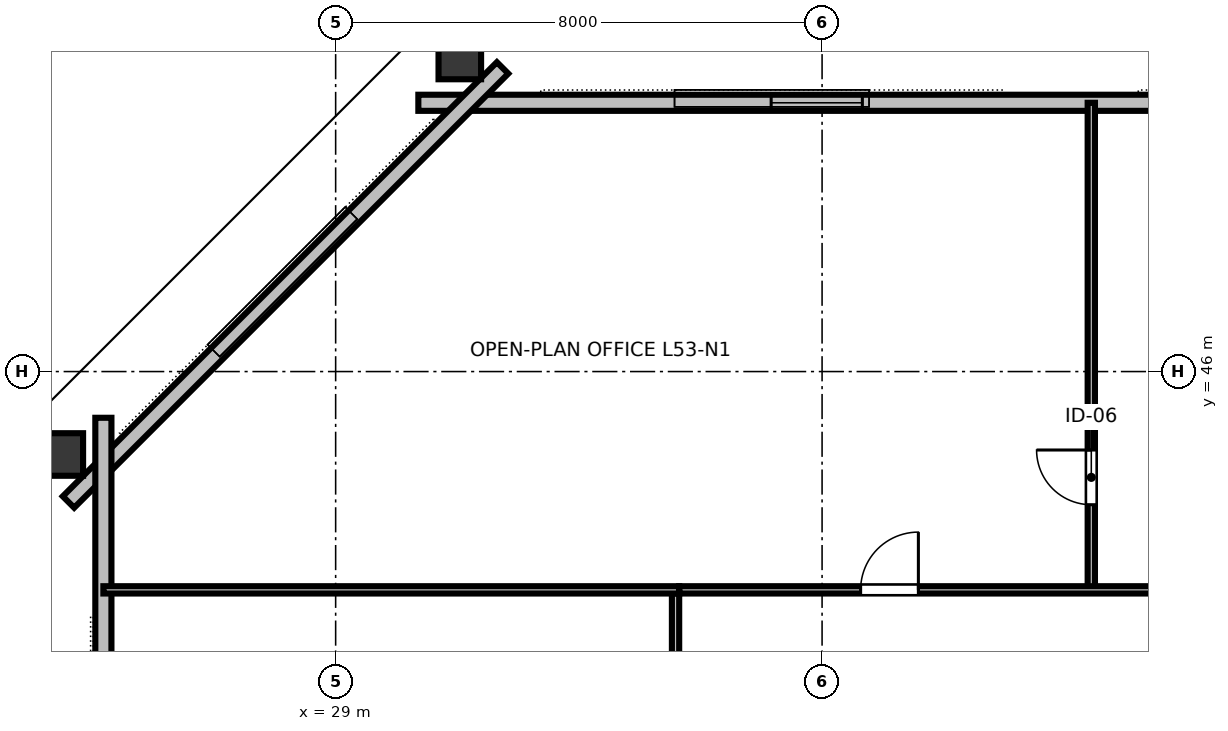
"""IFC4 building model, lengths in metres.
Left out: names, types, materials, properties, quantities, classifications, styles, units other than length and angle.
Written with IfcOpenShell. Run it as: python <this file> out.ifc"""

import sys

from ifc_helpers import new_model, si_unit, direction, frame, frame_2d, origin, origin_2d, place, context, subcontext, project, spatial, rectangle, hollow_rectangle, extrude, element, fill, save


model = new_model("IFC4")
c1 = context("Model", 3, precision=1e-05, world=origin(), true_north=direction((0.0, 1.0)))
c2 = subcontext(c1, "Body", "Model", "MODEL_VIEW")
j1 = project(units=[si_unit("LENGTHUNIT", "METRE"), si_unit("PLANEANGLEUNIT", "RADIAN")], contexts=[c1])
p1 = place(None, origin())
s1 = spatial("IfcSite", under=j1, at=p1, CompositionType="ELEMENT")
p2 = place(p1, origin())
s2 = spatial("IfcBuilding", under=s1, at=p2, CompositionType="ELEMENT")
p3 = place(p2, frame((0.0, 0.0, 202.2)))
s3 = spatial("IfcBuildingStorey", under=s2, at=p3, CompositionType="ELEMENT", Elevation=202.2)
for number, where, z_axis, x_axis in (
    (1, (31.042, 51.232, 0.0), (0.0, 0.0, 1.0), (1.0, 0.0, 0.0)),
    (2, (24.421, 44.636, 0.0), (0.0, 0.0, 1.0), (0.0, 1.0, 0.0)),
):
    element("IfcColumn", number, at=place(p3, frame(where, z_axis=z_axis, x_axis=x_axis)), inside=s3, PredefinedType="COLUMN", context=c2, shape_type="SweptSolid", body=[
        extrude(hollow_rectangle(XDim=0.7, YDim=0.85, WallThickness=0.04, at=origin_2d()), origin(), (0.0, 0.0, 1.0), 3.373),
    ])
p4 = place(p3, frame((61.64, 50.42, 0.0), z_axis=(0.0, 0.0, 1.0), x_axis=(-1.0, 0.0, 0.0)))
e3 = element("IfcWall", 3, at=p4, inside=s3, PredefinedType="STANDARD", context=c2, shape_type="SweptSolid", body=[
    extrude(rectangle(XDim=31.28, YDim=0.265, at=frame_2d((15.64, 0.0))), origin(), (0.0, 0.0, 1.0), 3.375),
])
p5 = place(p4, frame((5.802, 0.0, 0.85)))
e4 = element("IfcOpeningElement", 4, at=p5, cuts=e3, PredefinedType="OPENING", context=c2, shape_type="SweptSolid", body=[
    extrude(rectangle(XDim=1.5, YDim=1.85, at=frame_2d((0.75, 0.925))), frame((0.0, 0.142, 0.0), z_axis=(0.0, -1.0, 0.0), x_axis=(1.0, 0.0, 0.0)), (0.0, 0.0, 1.0), 0.285),
])
p6 = place(p4, frame((9.438, 0.0, 0.85)))
e5 = element("IfcOpeningElement", 5, at=p6, cuts=e3, PredefinedType="OPENING", context=c2, shape_type="SweptSolid", body=[
    extrude(rectangle(XDim=1.5, YDim=1.85, at=frame_2d((0.75, 0.925))), frame((0.0, 0.142, 0.0), z_axis=(0.0, -1.0, 0.0), x_axis=(1.0, 0.0, 0.0)), (0.0, 0.0, 1.0), 0.285),
])
p7 = place(p4, frame((13.073, 0.0, 0.85)))
e6 = element("IfcOpeningElement", 6, at=p7, cuts=e3, PredefinedType="OPENING", context=c2, shape_type="SweptSolid", body=[
    extrude(rectangle(XDim=1.5, YDim=1.85, at=frame_2d((0.75, 0.925))), frame((0.0, 0.142, 0.0), z_axis=(0.0, -1.0, 0.0), x_axis=(1.0, 0.0, 0.0)), (0.0, 0.0, 1.0), 0.285),
])
p8 = place(p4, frame((16.708, 0.0, 0.85)))
e7 = element("IfcOpeningElement", 7, at=p8, cuts=e3, PredefinedType="OPENING", context=c2, shape_type="SweptSolid", body=[
    extrude(rectangle(XDim=1.5, YDim=1.85, at=frame_2d((0.75, 0.925))), frame((0.0, 0.142, 0.0), z_axis=(0.0, -1.0, 0.0), x_axis=(1.0, 0.0, 0.0)), (0.0, 0.0, 1.0), 0.285),
])
p9 = place(p4, frame((23.978, 0.0, 0.85)))
e8 = element("IfcOpeningElement", 8, at=p9, cuts=e3, PredefinedType="OPENING", context=c2, shape_type="SweptSolid", body=[
    extrude(rectangle(XDim=1.5, YDim=1.85, at=frame_2d((0.75, 0.925))), frame((0.0, 0.142, 0.0), z_axis=(0.0, -1.0, 0.0), x_axis=(1.0, 0.0, 0.0)), (0.0, 0.0, 1.0), 0.285),
])
p10 = place(p3, frame((31.746, 50.994, 0.0), z_axis=(0.0, 0.0, 1.0), x_axis=(-0.707106781187, -0.707106781187, 0.0)))
e9 = element("IfcWall", 9, at=p10, inside=s3, PredefinedType="STANDARD", context=c2, shape_type="SweptSolid", body=[
    extrude(rectangle(XDim=10.097, YDim=0.265, at=frame_2d((5.048, 0.0))), origin(), (0.0, 0.0, 1.0), 3.375),
])
p11 = place(p3, frame((25.18, 45.24, 0.0), z_axis=(0.0, 0.0, 1.0), x_axis=(0.0, -1.0, 0.0)))
e10 = element("IfcWall", 10, at=p11, inside=s3, PredefinedType="STANDARD", context=c2, shape_type="SweptSolid", body=[
    extrude(rectangle(XDim=26.48, YDim=0.265, at=frame_2d((13.24, 0.0))), origin(), (0.0, 0.0, 1.0), 3.375),
])
p12 = place(p11, frame((6.42, 0.0, 0.85)))
e11 = element("IfcOpeningElement", 11, at=p12, cuts=e10, PredefinedType="OPENING", context=c2, shape_type="SweptSolid", body=[
    extrude(rectangle(XDim=1.5, YDim=1.85, at=frame_2d((0.75, 0.925))), frame((0.0, 0.142, 0.0), z_axis=(0.0, -1.0, 0.0), x_axis=(1.0, 0.0, 0.0)), (0.0, 0.0, 1.0), 0.285),
])
p13 = place(p11, frame((14.513, 0.0, 0.85)))
e12 = element("IfcOpeningElement", 12, at=p13, cuts=e10, PredefinedType="OPENING", context=c2, shape_type="SweptSolid", body=[
    extrude(rectangle(XDim=1.5, YDim=1.85, at=frame_2d((0.75, 0.925))), frame((0.0, 0.142, 0.0), z_axis=(0.0, -1.0, 0.0), x_axis=(1.0, 0.0, 0.0)), (0.0, 0.0, 1.0), 0.285),
])
p14 = place(p11, frame((18.56, 0.0, 0.85)))
e13 = element("IfcOpeningElement", 13, at=p14, cuts=e10, PredefinedType="OPENING", context=c2, shape_type="SweptSolid", body=[
    extrude(rectangle(XDim=1.5, YDim=1.85, at=frame_2d((0.75, 0.925))), frame((0.0, 0.142, 0.0), z_axis=(0.0, -1.0, 0.0), x_axis=(1.0, 0.0, 0.0)), (0.0, 0.0, 1.0), 0.285),
])
p15 = place(p3, frame((41.428, 42.41, 0.0), z_axis=(0.0, 0.0, 1.0), x_axis=(0.0, 1.0, 0.0)))
e14 = element("IfcWall", 14, at=p15, inside=s3, PredefinedType="PARTITIONING", context=c2, shape_type="SweptSolid", body=[
    extrude(rectangle(XDim=8.01, YDim=0.12, at=frame_2d((4.005, 0.0))), origin(), (0.0, 0.0, 1.0), 2.655),
])
p16 = place(p15, frame((1.4, 0.0, 0.0)))
e15 = element("IfcOpeningElement", 15, at=p16, cuts=e14, PredefinedType="OPENING", context=c2, shape_type="SweptSolid", body=[
    extrude(rectangle(XDim=0.9, YDim=2.15, at=frame_2d((0.45, 1.075))), frame((0.0, 0.07, 0.0), z_axis=(0.0, -1.0, 0.0), x_axis=(1.0, 0.0, 0.0)), (0.0, 0.0, 1.0), 0.14),
])
p17 = place(p3, frame((34.65, 42.41, 0.0), z_axis=(0.0, 0.0, 1.0), x_axis=(1.0, 0.0, 0.0)))
e16 = element("IfcWall", 16, at=p17, inside=s3, PredefinedType="PARTITIONING", context=c2, shape_type="SweptSolid", body=[
    extrude(rectangle(XDim=10.33, YDim=0.12, at=frame_2d((5.165, 0.0))), origin(), (0.0, 0.0, 1.0), 2.655),
])
p18 = place(p17, frame((2.984, 0.0, 0.0)))
e17 = element("IfcOpeningElement", 17, at=p18, cuts=e16, PredefinedType="OPENING", context=c2, shape_type="SweptSolid", body=[
    extrude(rectangle(XDim=0.95, YDim=2.15, at=frame_2d((0.475, 1.075))), frame((0.0, 0.07, 0.0), z_axis=(0.0, -1.0, 0.0), x_axis=(1.0, 0.0, 0.0)), (0.0, 0.0, 1.0), 0.14),
])
p19 = place(p17, frame((8.079, 0.0, 0.0)))
e18 = element("IfcOpeningElement", 18, at=p19, cuts=e16, PredefinedType="OPENING", context=c2, shape_type="SweptSolid", body=[
    extrude(rectangle(XDim=0.95, YDim=2.15, at=frame_2d((0.475, 1.075))), frame((0.0, 0.07, 0.0), z_axis=(0.0, -1.0, 0.0), x_axis=(1.0, 0.0, 0.0)), (0.0, 0.0, 1.0), 0.14),
])
p20 = place(p3, frame((34.59, 21.65, 0.0), z_axis=(0.0, 0.0, 1.0), x_axis=(0.0, 1.0, 0.0)))
e19 = element("IfcWall", 19, at=p20, inside=s3, PredefinedType="PARTITIONING", context=c2, shape_type="SweptSolid", body=[
    extrude(rectangle(XDim=20.7, YDim=0.12, at=frame_2d((10.35, 0.0))), origin(), (0.0, 0.0, 1.0), 2.655),
])
p21 = place(p20, frame((2.698, 0.0, 0.0)))
e20 = element("IfcOpeningElement", 20, at=p21, cuts=e19, PredefinedType="OPENING", context=c2, shape_type="SweptSolid", body=[
    extrude(rectangle(XDim=0.95, YDim=2.15, at=frame_2d((0.475, 1.075))), frame((0.0, 0.07, 0.0), z_axis=(0.0, -1.0, 0.0), x_axis=(1.0, 0.0, 0.0)), (0.0, 0.0, 1.0), 0.14),
])
p22 = place(p20, frame((8.556, 0.0, 0.0)))
e21 = element("IfcOpeningElement", 21, at=p22, cuts=e19, PredefinedType="OPENING", context=c2, shape_type="SweptSolid", body=[
    extrude(rectangle(XDim=0.95, YDim=2.15, at=frame_2d((0.475, 1.075))), frame((0.0, 0.07, 0.0), z_axis=(0.0, -1.0, 0.0), x_axis=(1.0, 0.0, 0.0)), (0.0, 0.0, 1.0), 0.14),
])
p23 = place(p20, frame((15.733, 0.0, 0.0)))
e22 = element("IfcOpeningElement", 22, at=p23, cuts=e19, PredefinedType="OPENING", context=c2, shape_type="SweptSolid", body=[
    extrude(rectangle(XDim=0.95, YDim=2.15, at=frame_2d((0.475, 1.075))), frame((0.0, 0.07, 0.0), z_axis=(0.0, -1.0, 0.0), x_axis=(1.0, 0.0, 0.0)), (0.0, 0.0, 1.0), 0.14),
])
p24 = place(p3, frame((34.65, 42.41, 0.0), z_axis=(0.0, 0.0, 1.0), x_axis=(-1.0, 0.0, 0.0)))
e23 = element("IfcWall", 23, at=p24, inside=s3, PredefinedType="PARTITIONING", context=c2, shape_type="SweptSolid", body=[
    extrude(rectangle(XDim=9.47, YDim=0.12, at=frame_2d((4.735, 0.0))), origin(), (0.0, 0.0, 1.0), 2.655),
])
p25 = place(p9, origin())
e24 = element("IfcWindow", 24, at=p25, inside=s3, PartitioningType="SINGLE_PANEL", PredefinedType="WINDOW", context=c2, shape_type="SweptSolid", body=[
    extrude(rectangle(XDim=1.5, YDim=1.85, at=frame_2d((0.75, 0.925))), frame((0.0, 0.03, 0.0), z_axis=(0.0, -1.0, 0.0), x_axis=(1.0, 0.0, 0.0)), (0.0, 0.0, 1.0), 0.06),
])
fill(e8, e24)
p26 = place(p16, origin())
e25 = element("IfcDoor", 25, at=p26, inside=s3, OperationType="SINGLE_SWING_RIGHT", PredefinedType="DOOR", context=c2, shape_type="SweptSolid", body=[
    extrude(rectangle(XDim=0.9, YDim=2.15, at=frame_2d((0.45, 1.075))), frame((0.0, 0.025, 0.0), z_axis=(0.0, -1.0, 0.0), x_axis=(1.0, 0.0, 0.0)), (0.0, 0.0, 1.0), 0.05),
])
fill(e15, e25)
p27 = place(p18, origin())
e26 = element("IfcDoor", 26, at=p27, inside=s3, OperationType="SINGLE_SWING_RIGHT", PredefinedType="DOOR", context=c2, shape_type="SweptSolid", body=[
    extrude(rectangle(XDim=0.95, YDim=2.15, at=frame_2d((0.475, 1.075))), frame((0.0, 0.025, 0.0), z_axis=(0.0, -1.0, 0.0), x_axis=(1.0, 0.0, 0.0)), (0.0, 0.0, 1.0), 0.05),
])
fill(e17, e26)
save(model, sys.argv[1])
